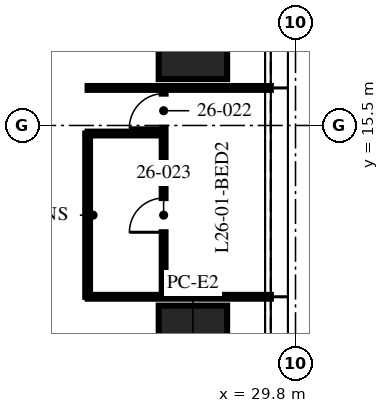
"""IFC4 building model, lengths in metres.
Left out: names, types, materials, properties, quantities, classifications, styles, units other than length and angle.
Written with IfcOpenShell. Run it as: python <this file> out.ifc"""

import sys

from ifc_helpers import new_model, si_unit, direction, frame, frame_2d, origin, origin_2d, place, context, subcontext, project, spatial, rectangle, hollow_rectangle, extrude, element, fill, save


model = new_model("IFC4")
c1 = context("Model", 3, precision=1e-05, world=origin(), true_north=direction((0.0, 1.0)))
c2 = subcontext(c1, "Body", "Model", "MODEL_VIEW")
j1 = project(units=[si_unit("LENGTHUNIT", "METRE"), si_unit("PLANEANGLEUNIT", "RADIAN")], contexts=[c1])
p1 = place(None, origin())
s1 = spatial("IfcSite", under=j1, at=p1, CompositionType="ELEMENT")
p2 = place(p1, origin())
s2 = spatial("IfcBuilding", under=s1, at=p2, CompositionType="ELEMENT")
p3 = place(p2, frame((0.0, 0.0, 107.25)))
s3 = spatial("IfcBuildingStorey", under=s2, at=p3, CompositionType="ELEMENT", Elevation=107.25)
p4 = place(p3, frame((27.1, 18.32, 0.08), z_axis=(0.0, 0.0, 1.0), x_axis=(0.0, 1.0, 0.0)))
e1 = element("IfcColumn", 1, at=p4, inside=s3, PredefinedType="COLUMN", context=c2, shape_type="SweptSolid", body=[
    extrude(hollow_rectangle(XDim=3.2, YDim=1.8, WallThickness=0.2, at=origin_2d()), origin(), (0.0, 0.0, 1.0), 3.67),
])
p5 = place(p3, frame((27.1, 9.16, -0.07), z_axis=(0.0, 0.0, 1.0), x_axis=(0.0, 1.0, 0.0)))
e2 = element("IfcColumn", 2, at=p5, inside=s3, PredefinedType="COLUMN", context=c2, shape_type="SweptSolid", body=[
    extrude(hollow_rectangle(XDim=3.2, YDim=1.8, WallThickness=0.2, at=origin_2d()), origin(), (0.0, 0.0, 1.0), 3.82),
])
for number, where, z_axis, x_axis in (
    (3, (24.33, 10.992, 0.0), (0.0, 0.0, 1.0), (1.0, 0.0, 0.0)),
    (4, (24.33, 16.488, 0.0), (0.0, 0.0, 1.0), (1.0, 0.0, 0.0)),
):
    element("IfcWall", number, at=place(p3, frame(where, z_axis=z_axis, x_axis=x_axis)), inside=s3, PredefinedType="PARTITIONING", context=c2, shape_type="SweptSolid", body=[
        extrude(rectangle(XDim=4.82, YDim=0.1, at=frame_2d((2.41, 0.0))), origin(), (0.0, 0.0, 1.0), 2.81),
    ])
p6 = place(p3, frame((26.33, 10.992, 0.0), z_axis=(0.0, 0.0, 1.0), x_axis=(0.0, 1.0, 0.0)))
e5 = element("IfcWall", 5, at=p6, inside=s3, PredefinedType="PARTITIONING", context=c2, shape_type="SweptSolid", body=[
    extrude(rectangle(XDim=5.496, YDim=0.1, at=frame_2d((2.748, 0.0))), origin(), (0.0, 0.0, 1.0), 2.81),
])
p7 = place(p6, frame((4.446, 0.0, 0.0)))
e6 = element("IfcOpeningElement", 6, at=p7, cuts=e5, PredefinedType="OPENING", context=c2, shape_type="SweptSolid", body=[
    extrude(rectangle(XDim=0.9, YDim=2.1, at=frame_2d((0.45, 1.05))), frame((0.0, 0.06, 0.0), z_axis=(0.0, -1.0, 0.0), x_axis=(1.0, 0.0, 0.0)), (0.0, 0.0, 1.0), 0.12),
])
p8 = place(p6, frame((1.698, 0.0, 0.0)))
e7 = element("IfcOpeningElement", 7, at=p8, cuts=e5, PredefinedType="OPENING", context=c2, shape_type="SweptSolid", body=[
    extrude(rectangle(XDim=0.9, YDim=2.1, at=frame_2d((0.45, 1.05))), frame((0.0, 0.06, 0.0), z_axis=(0.0, -1.0, 0.0), x_axis=(1.0, 0.0, 0.0)), (0.0, 0.0, 1.0), 0.12),
])
p9 = place(p3, frame((24.33, 15.288, 0.0), z_axis=(0.0, 0.0, 1.0), x_axis=(1.0, 0.0, 0.0)))
e8 = element("IfcWall", 8, at=p9, inside=s3, PredefinedType="PARTITIONING", context=c2, shape_type="SweptSolid", body=[
    extrude(rectangle(XDim=2.0, YDim=0.1, at=frame_2d((1.0, 0.0))), origin(), (0.0, 0.0, 1.0), 3.5),
])
p10 = place(p3, frame((24.33, 10.992, 0.0), z_axis=(0.0, 0.0, 1.0), x_axis=(0.0, 1.0, 0.0)))
e9 = element("IfcWall", 9, at=p10, inside=s3, PredefinedType="PARTITIONING", context=c2, shape_type="SweptSolid", body=[
    extrude(rectangle(XDim=4.296, YDim=0.125, at=frame_2d((2.148, 0.0))), origin(), (0.0, 0.0, 1.0), 2.81),
])
p11 = place(p7, origin())
e10 = element("IfcDoor", 10, at=p11, inside=s3, OperationType="SINGLE_SWING_LEFT", PredefinedType="DOOR", context=c2, shape_type="SweptSolid", body=[
    extrude(rectangle(XDim=0.9, YDim=2.1, at=frame_2d((0.45, 1.05))), frame((0.0, 0.025, 0.0), z_axis=(0.0, -1.0, 0.0), x_axis=(1.0, 0.0, 0.0)), (0.0, 0.0, 1.0), 0.05),
])
fill(e6, e10)
p12 = place(p8, origin())
e11 = element("IfcDoor", 11, at=p12, inside=s3, OperationType="SINGLE_SWING_LEFT", PredefinedType="DOOR", context=c2, shape_type="SweptSolid", body=[
    extrude(rectangle(XDim=0.9, YDim=2.1, at=frame_2d((0.45, 1.05))), frame((0.0, 0.025, 0.0), z_axis=(0.0, -1.0, 0.0), x_axis=(1.0, 0.0, 0.0)), (0.0, 0.0, 1.0), 0.05),
])
fill(e7, e11)
save(model, sys.argv[1])
